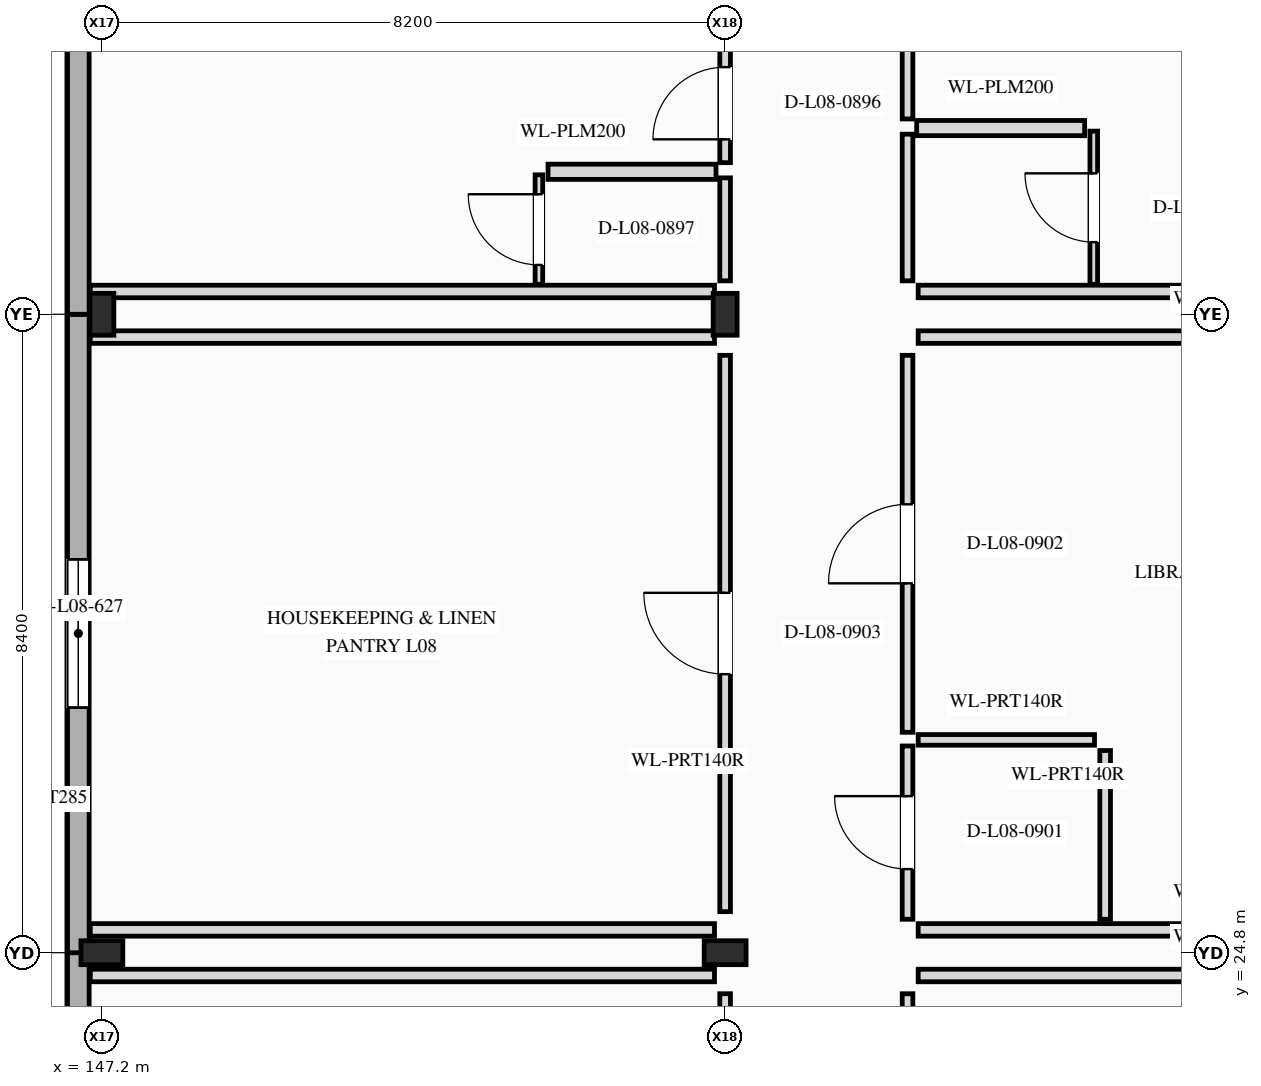
"""IFC4 building model, lengths in metres.
Left out: names, types, materials, properties, quantities, classifications, styles, units other than length and angle.
Written with IfcOpenShell. Run it as: python <this file> out.ifc"""

import sys

from ifc_helpers import new_model, si_unit, direction, frame, frame_2d, origin, origin_2d, place, context, subcontext, project, spatial, rectangle, i_section, extrude, element, fill, save


model = new_model("IFC4")
c1 = context("Model", 3, precision=1e-05, world=origin(), true_north=direction((0.0, 1.0)))
c2 = subcontext(c1, "Body", "Model", "MODEL_VIEW")
j1 = project(units=[si_unit("LENGTHUNIT", "METRE"), si_unit("PLANEANGLEUNIT", "RADIAN")], contexts=[c1])
p1 = place(None, origin())
s1 = spatial("IfcSite", under=j1, at=p1, CompositionType="ELEMENT")
p2 = place(p1, origin())
s2 = spatial("IfcBuilding", under=s1, at=p2, CompositionType="ELEMENT")
p3 = place(p2, frame((0.0, 0.0, 34.1)))
s3 = spatial("IfcBuildingStorey", under=s2, at=p3, CompositionType="ELEMENT", Elevation=34.1)
for number, where, z_axis, x_axis in (
    (1, (147.2, 24.8, 0.0), (0.0, 0.0, 1.0), (0.0, 1.0, 0.0)),
    (2, (147.2, 33.2, 0.0), (0.0, 0.0, 1.0), (1.0, 0.0, 0.0)),
    (3, (155.4, 24.8, 0.0), (0.0, 0.0, 1.0), (0.0, 1.0, 0.0)),
    (4, (155.4, 33.2, 0.0), (0.0, 0.0, 1.0), (1.0, 0.0, 0.0)),
):
    element("IfcColumn", number, at=place(p3, frame(where, z_axis=z_axis, x_axis=x_axis)), inside=s3, PredefinedType="COLUMN", context=c2, shape_type="SweptSolid", body=[
        extrude(i_section(OverallWidth=0.315, OverallDepth=0.551, WebThickness=0.015, FlangeThickness=0.024, at=origin_2d()), origin(), (0.0, 0.0, 1.0), 3.5),
    ])
p4 = place(p3, frame((146.89, 19.254, 0.0), z_axis=(0.0, 0.0, 1.0), x_axis=(0.0, 1.0, 0.0)))
e5 = element("IfcWall", 5, at=p4, inside=s3, PredefinedType="STANDARD", context=c2, shape_type="SweptSolid", body=[
    extrude(rectangle(XDim=5.546, YDim=0.285, at=frame_2d((2.773, 0.0))), origin(), (0.0, 0.0, 1.0), 3.5),
])
p5 = place(p4, frame((1.698, 0.0, 0.85)))
e6 = element("IfcOpeningElement", 6, at=p5, cuts=e5, PredefinedType="OPENING", context=c2, shape_type="SweptSolid", body=[
    extrude(rectangle(XDim=1.8, YDim=1.8, at=frame_2d((0.9, 0.9))), frame((0.0, 0.152, 0.0), z_axis=(0.0, -1.0, 0.0), x_axis=(1.0, 0.0, 0.0)), (0.0, 0.0, 1.0), 0.305),
])
p6 = place(p3, frame((146.89, 24.8, 0.0), z_axis=(0.0, 0.0, 1.0), x_axis=(0.0, 1.0, 0.0)))
e7 = element("IfcWall", 7, at=p6, inside=s3, PredefinedType="STANDARD", context=c2, shape_type="SweptSolid", body=[
    extrude(rectangle(XDim=8.4, YDim=0.285, at=frame_2d((4.2, 0.0))), origin(), (0.0, 0.0, 1.0), 3.5),
])
p7 = place(p6, frame((3.225, 0.0, 0.85)))
e8 = element("IfcOpeningElement", 8, at=p7, cuts=e7, PredefinedType="OPENING", context=c2, shape_type="SweptSolid", body=[
    extrude(rectangle(XDim=1.95, YDim=1.85, at=frame_2d((0.975, 0.925))), frame((0.0, 0.152, 0.0), z_axis=(0.0, -1.0, 0.0), x_axis=(1.0, 0.0, 0.0)), (0.0, 0.0, 1.0), 0.305),
])
p8 = place(p3, frame((146.89, 33.2, 0.0), z_axis=(0.0, 0.0, 1.0), x_axis=(0.0, 1.0, 0.0)))
e9 = element("IfcWall", 9, at=p8, inside=s3, PredefinedType="STANDARD", context=c2, shape_type="SweptSolid", body=[
    extrude(rectangle(XDim=8.4, YDim=0.285, at=frame_2d((4.2, 0.0))), origin(), (0.0, 0.0, 1.0), 3.5),
])
p9 = place(p3, frame((157.8, 21.37, 0.0), z_axis=(0.0, 0.0, 1.0), x_axis=(0.0, 1.0, 0.0)))
e10 = element("IfcWall", 10, at=p9, inside=s3, PredefinedType="PARTITIONING", context=c2, shape_type="SweptSolid", body=[
    extrude(rectangle(XDim=2.89, YDim=0.14, at=frame_2d((1.445, 0.0))), origin(), (0.0, 0.0, 1.0), 2.748),
])
p10 = place(p9, frame((0.91, 0.0, 0.0)))
e11 = element("IfcOpeningElement", 11, at=p10, cuts=e10, PredefinedType="OPENING", context=c2, shape_type="SweptSolid", body=[
    extrude(rectangle(XDim=1.07, YDim=2.4, at=frame_2d((0.535, 1.2))), frame((0.0, 0.08, 0.0), z_axis=(0.0, -1.0, 0.0), x_axis=(1.0, 0.0, 0.0)), (0.0, 0.0, 1.0), 0.16),
])
p11 = place(p3, frame((157.94, 24.5, 0.0), z_axis=(0.0, 0.0, 1.0), x_axis=(1.0, 0.0, 0.0)))
e12 = element("IfcWall", 12, at=p11, inside=s3, PredefinedType="PARTITIONING", context=c2, shape_type="SweptSolid", body=[
    extrude(rectangle(XDim=8.213, YDim=0.165, at=frame_2d((4.106, 0.0))), origin(), (0.0, 0.0, 1.0), 2.58),
])
p12 = place(p3, frame((157.8, 33.64, 0.0), z_axis=(0.0, 0.0, 1.0), x_axis=(0.0, 1.0, 0.0)))
e13 = element("IfcWall", 13, at=p12, inside=s3, PredefinedType="PARTITIONING", context=c2, shape_type="SweptSolid", body=[
    extrude(rectangle(XDim=1.93, YDim=0.14, at=frame_2d((0.965, 0.0))), origin(), (0.0, 0.0, 1.0), 3.19),
])
p13 = place(p3, frame((157.8, 35.77, 0.0), z_axis=(0.0, 0.0, 1.0), x_axis=(0.0, 1.0, 0.0)))
e14 = element("IfcWall", 14, at=p13, inside=s3, PredefinedType="PARTITIONING", context=c2, shape_type="SweptSolid", body=[
    extrude(rectangle(XDim=5.29, YDim=0.14, at=frame_2d((2.645, 0.0))), origin(), (0.0, 0.0, 1.0), 3.19),
])
p14 = place(p13, frame((2.185, 0.0, 0.0)))
e15 = element("IfcOpeningElement", 15, at=p14, cuts=e14, PredefinedType="OPENING", context=c2, shape_type="SweptSolid", body=[
    extrude(rectangle(XDim=0.92, YDim=2.15, at=frame_2d((0.46, 1.075))), frame((0.0, 0.08, 0.0), z_axis=(0.0, -1.0, 0.0), x_axis=(1.0, 0.0, 0.0)), (0.0, 0.0, 1.0), 0.16),
])
p15 = place(p3, frame((157.94, 33.5, 0.0), z_axis=(0.0, 0.0, 1.0), x_axis=(1.0, 0.0, 0.0)))
e16 = element("IfcWall", 16, at=p15, inside=s3, PredefinedType="PARTITIONING", context=c2, shape_type="SweptSolid", body=[
    extrude(rectangle(XDim=8.213, YDim=0.165, at=frame_2d((4.106, 0.0))), origin(), (0.0, 0.0, 1.0), 2.58),
])
p16 = place(p3, frame((157.92, 35.65, 0.0), z_axis=(0.0, 0.0, 1.0), x_axis=(1.0, 0.0, 0.0)))
e17 = element("IfcWall", 17, at=p16, inside=s3, PredefinedType="PLUMBINGWALL", context=c2, shape_type="SweptSolid", body=[
    extrude(rectangle(XDim=2.21, YDim=0.2, at=frame_2d((1.105, 0.0))), origin(), (0.0, 0.0, 1.0), 3.19),
])
p17 = place(p3, frame((160.25, 33.594, 0.0), z_axis=(0.0, 0.0, 1.0), x_axis=(0.0, 1.0, 0.0)))
e18 = element("IfcWall", 18, at=p17, inside=s3, PredefinedType="PARTITIONING", context=c2, shape_type="SweptSolid", body=[
    extrude(rectangle(XDim=2.016, YDim=0.1, at=frame_2d((1.008, 0.0))), origin(), (0.0, 0.0, 1.0), 3.19),
])
p18 = place(p17, frame((0.555, 0.0, 0.0)))
e19 = element("IfcOpeningElement", 19, at=p18, cuts=e18, PredefinedType="OPENING", context=c2, shape_type="SweptSolid", body=[
    extrude(rectangle(XDim=0.905, YDim=2.1, at=frame_2d((0.453, 1.05))), frame((0.0, 0.06, 0.0), z_axis=(0.0, -1.0, 0.0), x_axis=(1.0, 0.0, 0.0)), (0.0, 0.0, 1.0), 0.12),
])
p19 = place(p3, frame((155.4, 33.64, 0.0), z_axis=(0.0, 0.0, 1.0), x_axis=(0.0, 1.0, 0.0)))
e20 = element("IfcWall", 20, at=p19, inside=s3, PredefinedType="PARTITIONING", context=c2, shape_type="SweptSolid", body=[
    extrude(rectangle(XDim=1.355, YDim=0.14, at=frame_2d((0.678, 0.0))), origin(), (0.0, 0.0, 1.0), 2.58),
])
p20 = place(p3, frame((155.4, 35.195, 0.0), z_axis=(0.0, 0.0, 1.0), x_axis=(0.0, 1.0, 0.0)))
e21 = element("IfcWall", 21, at=p20, inside=s3, PredefinedType="PARTITIONING", context=c2, shape_type="SweptSolid", body=[
    extrude(rectangle(XDim=1.565, YDim=0.14, at=frame_2d((0.782, 0.0))), origin(), (0.0, 0.0, 1.0), 2.58),
])
p21 = place(p20, frame((0.307, 0.0, 0.0)))
e22 = element("IfcOpeningElement", 22, at=p21, cuts=e21, PredefinedType="OPENING", context=c2, shape_type="SweptSolid", body=[
    extrude(rectangle(XDim=0.95, YDim=2.15, at=frame_2d((0.475, 1.075))), frame((0.0, 0.08, 0.0), z_axis=(0.0, -1.0, 0.0), x_axis=(1.0, 0.0, 0.0)), (0.0, 0.0, 1.0), 0.16),
])
p22 = place(p3, frame((147.048, 33.5, 0.0), z_axis=(0.0, 0.0, 1.0), x_axis=(1.0, 0.0, 0.0)))
e23 = element("IfcWall", 23, at=p22, inside=s3, PredefinedType="PARTITIONING", context=c2, shape_type="SweptSolid", body=[
    extrude(rectangle(XDim=8.212, YDim=0.165, at=frame_2d((4.106, 0.0))), origin(), (0.0, 0.0, 1.0), 2.603),
])
p23 = place(p3, frame((153.07, 35.075, 0.0), z_axis=(0.0, 0.0, 1.0), x_axis=(1.0, 0.0, 0.0)))
e24 = element("IfcWall", 24, at=p23, inside=s3, PredefinedType="PLUMBINGWALL", context=c2, shape_type="SweptSolid", body=[
    extrude(rectangle(XDim=2.21, YDim=0.2, at=frame_2d((1.105, 0.0))), origin(), (0.0, 0.0, 1.0), 3.19),
])
p24 = place(p3, frame((152.95, 33.594, 0.0), z_axis=(0.0, 0.0, 1.0), x_axis=(0.0, 1.0, 0.0)))
e25 = element("IfcWall", 25, at=p24, inside=s3, PredefinedType="PARTITIONING", context=c2, shape_type="SweptSolid", body=[
    extrude(rectangle(XDim=1.44, YDim=0.1, at=frame_2d((0.72, 0.0))), origin(), (0.0, 0.0, 1.0), 3.19),
])
p25 = place(p24, frame((0.255, 0.0, 0.0)))
e26 = element("IfcOpeningElement", 26, at=p25, cuts=e25, PredefinedType="OPENING", context=c2, shape_type="SweptSolid", body=[
    extrude(rectangle(XDim=0.93, YDim=2.14, at=frame_2d((0.465, 1.07))), frame((0.0, 0.06, 0.0), z_axis=(0.0, -1.0, 0.0), x_axis=(1.0, 0.0, 0.0)), (0.0, 0.0, 1.0), 0.12),
])
p26 = place(p3, frame((155.4, 19.34, 0.0), z_axis=(0.0, 0.0, 1.0), x_axis=(0.0, 1.0, 0.0)))
e27 = element("IfcWall", 27, at=p26, inside=s3, PredefinedType="PARTITIONING", context=c2, shape_type="SweptSolid", body=[
    extrude(rectangle(XDim=4.92, YDim=0.14, at=frame_2d((2.46, 0.0))), origin(), (0.0, 0.0, 1.0), 2.664),
])
p27 = place(p26, frame((1.955, 0.0, 0.0)))
e28 = element("IfcOpeningElement", 28, at=p27, cuts=e27, PredefinedType="OPENING", context=c2, shape_type="SweptSolid", body=[
    extrude(rectangle(XDim=1.01, YDim=2.2, at=frame_2d((0.505, 1.1))), frame((0.0, 0.08, 0.0), z_axis=(0.0, -1.0, 0.0), x_axis=(1.0, 0.0, 0.0)), (0.0, 0.0, 1.0), 0.16),
])
p28 = place(p3, frame((147.048, 24.5, 0.0), z_axis=(0.0, 0.0, 1.0), x_axis=(1.0, 0.0, 0.0)))
e29 = element("IfcWall", 29, at=p28, inside=s3, PredefinedType="PARTITIONING", context=c2, shape_type="SweptSolid", body=[
    extrude(rectangle(XDim=8.212, YDim=0.165, at=frame_2d((4.106, 0.0))), origin(), (0.0, 0.0, 1.0), 2.603),
])
p29 = place(p3, frame((157.8, 25.24, 0.0), z_axis=(0.0, 0.0, 1.0), x_axis=(0.0, 1.0, 0.0)))
e30 = element("IfcWall", 30, at=p29, inside=s3, PredefinedType="PARTITIONING", context=c2, shape_type="SweptSolid", body=[
    extrude(rectangle(XDim=2.28, YDim=0.14, at=frame_2d((1.14, 0.0))), origin(), (0.0, 0.0, 1.0), 2.743),
])
p30 = place(p29, frame((0.66, 0.0, 0.0)))
e31 = element("IfcOpeningElement", 31, at=p30, cuts=e30, PredefinedType="OPENING", context=c2, shape_type="SweptSolid", body=[
    extrude(rectangle(XDim=0.96, YDim=2.15, at=frame_2d((0.48, 1.075))), frame((0.0, 0.08, 0.0), z_axis=(0.0, -1.0, 0.0), x_axis=(1.0, 0.0, 0.0)), (0.0, 0.0, 1.0), 0.16),
])
p31 = place(p3, frame((160.4, 25.24, 0.0), z_axis=(0.0, 0.0, 1.0), x_axis=(0.0, 1.0, 0.0)))
e32 = element("IfcWall", 32, at=p31, inside=s3, PredefinedType="PARTITIONING", context=c2, shape_type="SweptSolid", body=[
    extrude(rectangle(XDim=2.22, YDim=0.14, at=frame_2d((1.11, 0.0))), origin(), (0.0, 0.0, 1.0), 2.743),
])
p32 = place(p3, frame((157.94, 27.6, 0.0), z_axis=(0.0, 0.0, 1.0), x_axis=(1.0, 0.0, 0.0)))
e33 = element("IfcWall", 33, at=p32, inside=s3, PredefinedType="PARTITIONING", context=c2, shape_type="SweptSolid", body=[
    extrude(rectangle(XDim=2.32, YDim=0.14, at=frame_2d((1.16, 0.0))), origin(), (0.0, 0.0, 1.0), 3.19),
])
p33 = place(p3, frame((157.8, 27.7, 0.0), z_axis=(0.0, 0.0, 1.0), x_axis=(0.0, 1.0, 0.0)))
e34 = element("IfcWall", 34, at=p33, inside=s3, PredefinedType="PARTITIONING", context=c2, shape_type="SweptSolid", body=[
    extrude(rectangle(XDim=4.96, YDim=0.14, at=frame_2d((2.48, 0.0))), origin(), (0.0, 0.0, 1.0), 2.743),
])
p34 = place(p33, frame((1.96, 0.0, 0.0)))
e35 = element("IfcOpeningElement", 35, at=p34, cuts=e34, PredefinedType="OPENING", context=c2, shape_type="SweptSolid", body=[
    extrude(rectangle(XDim=1.04, YDim=2.25, at=frame_2d((0.52, 1.125))), frame((0.0, 0.08, 0.0), z_axis=(0.0, -1.0, 0.0), x_axis=(1.0, 0.0, 0.0)), (0.0, 0.0, 1.0), 0.16),
])
for number, where, z_axis, x_axis in (
    (36, (157.94, 25.1, 0.0), (0.0, 0.0, 1.0), (1.0, 0.0, 0.0)),
    (37, (157.94, 32.9, 0.0), (0.0, 0.0, 1.0), (1.0, 0.0, 0.0)),
):
    element("IfcWall", number, at=place(p3, frame(where, z_axis=z_axis, x_axis=x_axis)), inside=s3, PredefinedType="PARTITIONING", context=c2, shape_type="SweptSolid", body=[
        extrude(rectangle(XDim=8.213, YDim=0.165, at=frame_2d((4.106, 0.0))), origin(), (0.0, 0.0, 1.0), 2.58),
    ])
p35 = place(p3, frame((155.4, 25.34, 0.0), z_axis=(0.0, 0.0, 1.0), x_axis=(0.0, 1.0, 0.0)))
e38 = element("IfcWall", 38, at=p35, inside=s3, PredefinedType="PARTITIONING", context=c2, shape_type="SweptSolid", body=[
    extrude(rectangle(XDim=7.32, YDim=0.14, at=frame_2d((3.66, 0.0))), origin(), (0.0, 0.0, 1.0), 2.664),
])
p36 = place(p35, frame((3.125, 0.0, 0.0)))
e39 = element("IfcOpeningElement", 39, at=p36, cuts=e38, PredefinedType="OPENING", context=c2, shape_type="SweptSolid", body=[
    extrude(rectangle(XDim=1.07, YDim=2.25, at=frame_2d((0.535, 1.125))), frame((0.0, 0.08, 0.0), z_axis=(0.0, -1.0, 0.0), x_axis=(1.0, 0.0, 0.0)), (0.0, 0.0, 1.0), 0.16),
])
for number, where, z_axis, x_axis in (
    (40, (147.048, 25.1, 0.0), (0.0, 0.0, 1.0), (1.0, 0.0, 0.0)),
    (41, (147.048, 32.9, 0.0), (0.0, 0.0, 1.0), (1.0, 0.0, 0.0)),
):
    element("IfcWall", number, at=place(p3, frame(where, z_axis=z_axis, x_axis=x_axis)), inside=s3, PredefinedType="PARTITIONING", context=c2, shape_type="SweptSolid", body=[
        extrude(rectangle(XDim=8.212, YDim=0.165, at=frame_2d((4.106, 0.0))), origin(), (0.0, 0.0, 1.0), 2.603),
    ])
p37 = place(p7, origin())
e42 = element("IfcWindow", 42, at=p37, inside=s3, PartitioningType="SINGLE_PANEL", PredefinedType="WINDOW", context=c2, shape_type="SweptSolid", body=[
    extrude(rectangle(XDim=1.95, YDim=1.85, at=frame_2d((0.975, 0.925))), frame((0.0, 0.03, 0.0), z_axis=(0.0, -1.0, 0.0), x_axis=(1.0, 0.0, 0.0)), (0.0, 0.0, 1.0), 0.06),
])
fill(e8, e42)
p38 = place(p18, origin())
e43 = element("IfcDoor", 43, at=p38, inside=s3, OperationType="SINGLE_SWING_RIGHT", PredefinedType="DOOR", context=c2, shape_type="SweptSolid", body=[
    extrude(rectangle(XDim=0.905, YDim=2.1, at=frame_2d((0.453, 1.05))), frame((0.0, 0.025, 0.0), z_axis=(0.0, -1.0, 0.0), x_axis=(1.0, 0.0, 0.0)), (0.0, 0.0, 1.0), 0.05),
])
fill(e19, e43)
p39 = place(p21, origin())
e44 = element("IfcDoor", 44, at=p39, inside=s3, OperationType="SINGLE_SWING_LEFT", PredefinedType="DOOR", context=c2, shape_type="SweptSolid", body=[
    extrude(rectangle(XDim=0.95, YDim=2.15, at=frame_2d((0.475, 1.075))), frame((0.0, 0.025, 0.0), z_axis=(0.0, -1.0, 0.0), x_axis=(1.0, 0.0, 0.0)), (0.0, 0.0, 1.0), 0.05),
])
fill(e22, e44)
p40 = place(p25, origin())
e45 = element("IfcDoor", 45, at=p40, inside=s3, OperationType="SINGLE_SWING_RIGHT", PredefinedType="DOOR", context=c2, shape_type="SweptSolid", body=[
    extrude(rectangle(XDim=0.93, YDim=2.14, at=frame_2d((0.465, 1.07))), frame((0.0, 0.025, 0.0), z_axis=(0.0, -1.0, 0.0), x_axis=(1.0, 0.0, 0.0)), (0.0, 0.0, 1.0), 0.05),
])
fill(e26, e45)
p41 = place(p30, origin())
e46 = element("IfcDoor", 46, at=p41, inside=s3, OperationType="SINGLE_SWING_RIGHT", PredefinedType="DOOR", context=c2, shape_type="SweptSolid", body=[
    extrude(rectangle(XDim=0.96, YDim=2.15, at=frame_2d((0.48, 1.075))), frame((0.0, 0.025, 0.0), z_axis=(0.0, -1.0, 0.0), x_axis=(1.0, 0.0, 0.0)), (0.0, 0.0, 1.0), 0.05),
])
fill(e31, e46)
p42 = place(p34, origin())
e47 = element("IfcDoor", 47, at=p42, inside=s3, OperationType="SINGLE_SWING_LEFT", PredefinedType="DOOR", context=c2, shape_type="SweptSolid", body=[
    extrude(rectangle(XDim=1.04, YDim=2.25, at=frame_2d((0.52, 1.125))), frame((0.0, 0.025, 0.0), z_axis=(0.0, -1.0, 0.0), x_axis=(1.0, 0.0, 0.0)), (0.0, 0.0, 1.0), 0.05),
])
fill(e35, e47)
p43 = place(p36, origin())
e48 = element("IfcDoor", 48, at=p43, inside=s3, OperationType="SINGLE_SWING_RIGHT", PredefinedType="DOOR", context=c2, shape_type="SweptSolid", body=[
    extrude(rectangle(XDim=1.07, YDim=2.25, at=frame_2d((0.535, 1.125))), frame((0.0, 0.025, 0.0), z_axis=(0.0, -1.0, 0.0), x_axis=(1.0, 0.0, 0.0)), (0.0, 0.0, 1.0), 0.05),
])
fill(e39, e48)
save(model, sys.argv[1])
